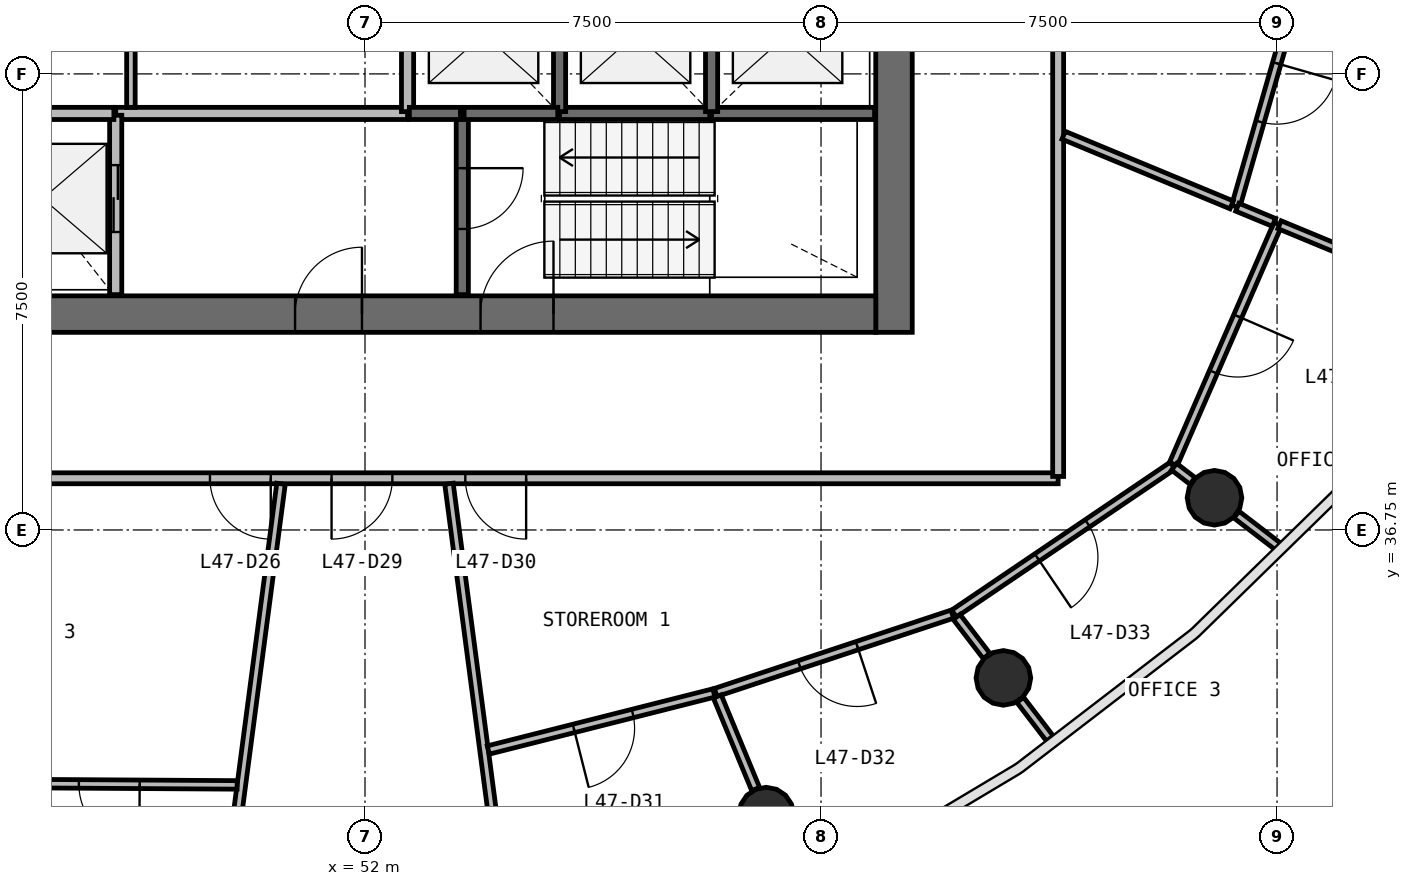
"""IFC4 building model, lengths in metres.
Left out: names, types, materials, properties, quantities, classifications, styles, units other than length and angle.
Written with IfcOpenShell. Run it as: python <this file> out.ifc"""

import sys

from ifc_helpers import new_model, si_unit, direction, frame, frame_2d, origin, origin_2d, place, context, subcontext, project, spatial, rectangle, circle, extrude, source, transform, mapped, element, fill, save


model = new_model("IFC4")
c1 = context("Model", 3, precision=1e-05, world=origin(), true_north=direction((0.0, 1.0)))
c2 = subcontext(c1, "Body", "Model", "MODEL_VIEW")
j1 = project(units=[si_unit("LENGTHUNIT", "METRE"), si_unit("PLANEANGLEUNIT", "RADIAN")], contexts=[c1])
p1 = place(None, origin())
s1 = spatial("IfcSite", under=j1, at=p1, CompositionType="ELEMENT")
p2 = place(p1, origin())
s2 = spatial("IfcBuilding", under=s1, at=p2, CompositionType="ELEMENT")
p3 = place(p2, frame((0.0, 0.0, 195.5)))
s3 = spatial("IfcBuildingStorey", under=s2, at=p3, CompositionType="ELEMENT", Elevation=195.5)
p4 = place(p3, frame((60.7, 40.0, 0.0), z_axis=(0.0, 0.0, 1.0), x_axis=(0.0, 1.0, 0.0)))
e1 = element("IfcWall", 1, at=p4, inside=s3, PredefinedType="SHEAR", context=c2, shape_type="SweptSolid", body=[
    extrude(rectangle(XDim=16.0, YDim=0.6, at=frame_2d((8.0, 0.0))), origin(), (0.0, 0.0, 1.0), 3.9),
])
p5 = place(p4, frame((7.1, 0.0, 0.0)))
e2 = element("IfcOpeningElement", 2, at=p5, cuts=e1, PredefinedType="OPENING", context=c2, shape_type="SweptSolid", body=[
    extrude(rectangle(XDim=1.8, YDim=2.1, at=frame_2d((0.9, 1.05))), frame((0.0, 0.31, 0.0), z_axis=(0.0, -1.0, 0.0), x_axis=(1.0, 0.0, 0.0)), (0.0, 0.0, 1.0), 0.62),
])
p6 = place(p3, frame((43.6, 40.3, 0.0), z_axis=(0.0, 0.0, 1.0), x_axis=(1.0, 0.0, 0.0)))
e3 = element("IfcWall", 3, at=p6, inside=s3, PredefinedType="SHEAR", context=c2, shape_type="SweptSolid", body=[
    extrude(rectangle(XDim=16.8, YDim=0.6, at=frame_2d((8.4, 0.0))), origin(), (0.0, 0.0, 1.0), 3.9),
])
p7 = place(p6, frame((10.3, 0.0, 0.0)))
e4 = element("IfcOpeningElement", 4, at=p7, cuts=e3, PredefinedType="OPENING", context=c2, shape_type="SweptSolid", body=[
    extrude(rectangle(XDim=1.2, YDim=2.1, at=frame_2d((0.6, 1.05))), frame((0.0, 0.31, 0.0), z_axis=(0.0, -1.0, 0.0), x_axis=(1.0, 0.0, 0.0)), (0.0, 0.0, 1.0), 0.62),
])
p8 = place(p6, frame((7.25, 0.0, 0.0)))
e5 = element("IfcOpeningElement", 5, at=p8, cuts=e3, PredefinedType="OPENING", context=c2, shape_type="SweptSolid", body=[
    extrude(rectangle(XDim=1.1, YDim=2.1, at=frame_2d((0.55, 1.05))), frame((0.0, 0.31, 0.0), z_axis=(0.0, -1.0, 0.0), x_axis=(1.0, 0.0, 0.0)), (0.0, 0.0, 1.0), 0.62),
])
p9 = place(p6, frame((0.7, 0.0, 0.0)))
e6 = element("IfcOpeningElement", 6, at=p9, cuts=e3, PredefinedType="OPENING", context=c2, shape_type="SweptSolid", body=[
    extrude(rectangle(XDim=0.8, YDim=2.1, at=frame_2d((0.4, 1.05))), frame((0.0, 0.31, 0.0), z_axis=(0.0, -1.0, 0.0), x_axis=(1.0, 0.0, 0.0)), (0.0, 0.0, 1.0), 0.62),
])
m1 = source(origin(), c2, "Body", "SweptSolid", [
    extrude(circle(Radius=0.45, at=origin_2d()), origin(), (0.0, 0.0, 1.0), 3.9),
])
for number, where, z_axis, x_axis in (
    (7, (58.599, 32.069, 0.0), (0.0, 0.0, 1.0), (1.0, 0.0, 0.0)),
    (8, (62.499, 34.317, 0.0), (0.0, 0.0, 1.0), (1.0, 0.0, 0.0)),
    (9, (65.971, 37.28, 0.0), (0.0, 0.0, 1.0), (1.0, 0.0, 0.0)),
):
    element("IfcColumn", number, at=place(p3, frame(where, z_axis=z_axis, x_axis=x_axis)), inside=s3, PredefinedType="COLUMN", context=c2, shape_type="MappedRepresentation", body=[
        mapped(m1, transform((0.0, 0.0, 0.0), scale=1.0)),
    ])
p10 = place(p3, frame((52.7, 43.6, 0.0), z_axis=(0.0, 0.0, 1.0), x_axis=(-1.0, 0.0, 0.0)))
e10 = element("IfcWall", 10, at=p10, inside=s3, PredefinedType="SOLIDWALL", context=c2, shape_type="SweptSolid", body=[
    extrude(rectangle(XDim=4.8, YDim=0.2, at=frame_2d((2.4, 0.0))), origin(), (0.0, 0.0, 1.0), 3.58),
])
p11 = place(p3, frame((47.9, 40.62, 0.0), z_axis=(0.0, 0.0, 1.0), x_axis=(0.0, 1.0, 0.0)))
e11 = element("IfcWall", 11, at=p11, inside=s3, PredefinedType="SOLIDWALL", context=c2, shape_type="SweptSolid", body=[
    extrude(rectangle(XDim=2.95, YDim=0.2, at=frame_2d((1.475, 0.0))), origin(), (0.0, 0.0, 1.0), 3.58),
])
p12 = place(p11, frame((1.03, 0.0, 0.0)))
e12 = element("IfcOpeningElement", 12, at=p12, cuts=e11, PredefinedType="OPENING", context=c2, shape_type="SweptSolid", body=[
    extrude(rectangle(XDim=1.1, YDim=2.1, at=frame_2d((0.55, 1.05))), frame((0.0, 0.11, 0.0), z_axis=(0.0, -1.0, 0.0), x_axis=(1.0, 0.0, 0.0)), (0.0, 0.0, 1.0), 0.22),
])
p13 = place(p3, frame((53.6, 43.6, 0.0), z_axis=(0.0, 0.0, 1.0), x_axis=(0.0, -1.0, 0.0)))
e13 = element("IfcWall", 13, at=p13, inside=s3, PredefinedType="SOLIDWALL", context=c2, shape_type="SweptSolid", body=[
    extrude(rectangle(XDim=2.98, YDim=0.2, at=frame_2d((1.49, 0.0))), origin(), (0.0, 0.0, 1.0), 3.58),
])
p14 = place(p13, frame((0.9, 0.0, 0.0)))
e14 = element("IfcOpeningElement", 14, at=p14, cuts=e13, PredefinedType="OPENING", context=c2, shape_type="SweptSolid", body=[
    extrude(rectangle(XDim=1.0, YDim=2.1, at=frame_2d((0.5, 1.05))), frame((0.0, 0.11, 0.0), z_axis=(0.0, -1.0, 0.0), x_axis=(1.0, 0.0, 0.0)), (0.0, 0.0, 1.0), 0.22),
])
p15 = place(p3, frame((57.7, 43.6, 0.0), z_axis=(0.0, 0.0, 1.0), x_axis=(1.0, 0.0, 0.0)))
e15 = element("IfcWall", 15, at=p15, inside=s3, PredefinedType="SOLIDWALL", context=c2, shape_type="SweptSolid", body=[
    extrude(rectangle(XDim=2.68, YDim=0.2, at=frame_2d((1.34, 0.0))), origin(), (0.0, 0.0, 1.0), 3.58),
])
p16 = place(p3, frame((55.2, 43.6, 0.0), z_axis=(0.0, 0.0, 1.0), x_axis=(1.0, 0.0, 0.0)))
e16 = element("IfcWall", 16, at=p16, inside=s3, PredefinedType="SOLIDWALL", context=c2, shape_type="SweptSolid", body=[
    extrude(rectangle(XDim=2.47, YDim=0.2, at=frame_2d((1.235, 0.0))), origin(), (0.0, 0.0, 1.0), 3.58),
])
p17 = place(p3, frame((47.87, 43.6, 0.0), z_axis=(0.0, 0.0, 1.0), x_axis=(-1.0, 0.0, 0.0)))
e17 = element("IfcWall", 17, at=p17, inside=s3, PredefinedType="SOLIDWALL", context=c2, shape_type="SweptSolid", body=[
    extrude(rectangle(XDim=2.34, YDim=0.2, at=frame_2d((1.17, 0.0))), origin(), (0.0, 0.0, 1.0), 3.58),
])
for number, where, z_axis, x_axis in (
    (18, (52.7, 45.99, 0.0), (0.0, 0.0, 1.0), (0.0, -1.0, 0.0)),
    (19, (55.2, 43.63, 0.0), (0.0, 0.0, 1.0), (0.0, 1.0, 0.0)),
    (20, (57.7, 43.63, 0.0), (0.0, 0.0, 1.0), (0.0, 1.0, 0.0)),
):
    element("IfcWall", number, at=place(p3, frame(where, z_axis=z_axis, x_axis=x_axis)), inside=s3, PredefinedType="SOLIDWALL", context=c2, shape_type="SweptSolid", body=[
        extrude(rectangle(XDim=2.36, YDim=0.2, at=frame_2d((1.18, 0.0))), origin(), (0.0, 0.0, 1.0), 3.58),
    ])
p18 = place(p3, frame((53.63, 43.6, 0.0), z_axis=(0.0, 0.0, 1.0), x_axis=(1.0, 0.0, 0.0)))
e21 = element("IfcWall", 21, at=p18, inside=s3, PredefinedType="SOLIDWALL", context=c2, shape_type="SweptSolid", body=[
    extrude(rectangle(XDim=1.54, YDim=0.2, at=frame_2d((0.77, 0.0))), origin(), (0.0, 0.0, 1.0), 3.58),
])
p19 = place(p3, frame((52.73, 43.6, 0.0), z_axis=(0.0, 0.0, 1.0), x_axis=(1.0, 0.0, 0.0)))
e22 = element("IfcWall", 22, at=p19, inside=s3, PredefinedType="SOLIDWALL", context=c2, shape_type="SweptSolid", body=[
    extrude(rectangle(XDim=0.84, YDim=0.2, at=frame_2d((0.42, 0.0))), origin(), (0.0, 0.0, 1.0), 3.58),
])
p20 = place(p3, frame((63.4, 37.6, 0.0), z_axis=(0.0, 0.0, 1.0), x_axis=(-1.0, 0.0, 0.0)))
e23 = element("IfcWall", 23, at=p20, inside=s3, PredefinedType="PARTITIONING", context=c2, shape_type="SweptSolid", body=[
    extrude(rectangle(XDim=22.8, YDim=0.18, at=frame_2d((11.4, 0.0))), origin(), (0.0, 0.0, 1.0), 2.88),
])
p21 = place(p20, frame((12.95, 0.0, 0.0)))
e24 = element("IfcOpeningElement", 24, at=p21, cuts=e23, PredefinedType="OPENING", context=c2, shape_type="SweptSolid", body=[
    extrude(rectangle(XDim=1.0, YDim=2.1, at=frame_2d((0.5, 1.05))), frame((0.0, 0.1, 0.0), z_axis=(0.0, -1.0, 0.0), x_axis=(1.0, 0.0, 0.0)), (0.0, 0.0, 1.0), 0.2),
])
p22 = place(p20, frame((10.95, 0.0, 0.0)))
e25 = element("IfcOpeningElement", 25, at=p22, cuts=e23, PredefinedType="OPENING", context=c2, shape_type="SweptSolid", body=[
    extrude(rectangle(XDim=1.0, YDim=2.1, at=frame_2d((0.5, 1.05))), frame((0.0, 0.1, 0.0), z_axis=(0.0, -1.0, 0.0), x_axis=(1.0, 0.0, 0.0)), (0.0, 0.0, 1.0), 0.2),
])
p23 = place(p20, frame((8.75, 0.0, 0.0)))
e26 = element("IfcOpeningElement", 26, at=p23, cuts=e23, PredefinedType="OPENING", context=c2, shape_type="SweptSolid", body=[
    extrude(rectangle(XDim=1.0, YDim=2.1, at=frame_2d((0.5, 1.05))), frame((0.0, 0.1, 0.0), z_axis=(0.0, -1.0, 0.0), x_axis=(1.0, 0.0, 0.0)), (0.0, 0.0, 1.0), 0.2),
])
p24 = place(p3, frame((63.4, 58.37, 0.0), z_axis=(0.0, 0.0, 1.0), x_axis=(0.0, -1.0, 0.0)))
e27 = element("IfcWall", 27, at=p24, inside=s3, PredefinedType="PARTITIONING", context=c2, shape_type="SweptSolid", body=[
    extrude(rectangle(XDim=20.74, YDim=0.18, at=frame_2d((10.37, 0.0))), origin(), (0.0, 0.0, 1.0), 2.88),
])
p25 = place(p24, frame((9.89, 0.0, 0.0)))
e28 = element("IfcOpeningElement", 28, at=p25, cuts=e27, PredefinedType="OPENING", context=c2, shape_type="SweptSolid", body=[
    extrude(rectangle(XDim=1.0, YDim=2.1, at=frame_2d((0.5, 1.05))), frame((0.0, 0.1, 0.0), z_axis=(0.0, -1.0, 0.0), x_axis=(1.0, 0.0, 0.0)), (0.0, 0.0, 1.0), 0.2),
])
p26 = place(p3, frame((49.653, 30.172, 0.0), z_axis=(0.0, 0.0, 1.0), x_axis=(0.130532164535, 0.991444075085, 0.0)))
e29 = element("IfcWall", 29, at=p26, inside=s3, PredefinedType="PARTITIONING", context=c2, shape_type="SweptSolid", body=[
    extrude(rectangle(XDim=7.401, YDim=0.14, at=frame_2d((3.7, 0.0))), origin(), (0.0, 0.0, 1.0), 2.88),
])
p27 = place(p3, frame((53.381, 37.51, 0.0), z_axis=(0.0, 0.0, 1.0), x_axis=(0.130519996386, -0.991445677051, 0.0)))
e30 = element("IfcWall", 30, at=p27, inside=s3, PredefinedType="PARTITIONING", context=c2, shape_type="SweptSolid", body=[
    extrude(rectangle(XDim=6.558, YDim=0.14, at=frame_2d((3.279, 0.0))), origin(), (0.0, 0.0, 1.0), 2.88),
])
p28 = place(p3, frame((49.896, 32.558, 0.0), z_axis=(0.0, 0.0, 1.0), x_axis=(-0.999981480768, 0.006085895215, 0.0)))
e31 = element("IfcWall", 31, at=p28, inside=s3, PredefinedType="PARTITIONING", context=c2, shape_type="SweptSolid", body=[
    extrude(rectangle(XDim=4.252, YDim=0.14, at=frame_2d((2.126, 0.0))), origin(), (0.0, 0.0, 1.0), 2.88),
])
p29 = place(p28, frame((1.602, 0.0, 0.0)))
e32 = element("IfcOpeningElement", 32, at=p29, cuts=e31, PredefinedType="OPENING", context=c2, shape_type="SweptSolid", body=[
    extrude(rectangle(XDim=1.0, YDim=2.1, at=frame_2d((0.5, 1.05))), frame((0.0, 0.08, 0.0), z_axis=(0.0, -1.0, 0.0), x_axis=(1.0, 0.0, 0.0)), (0.0, 0.0, 1.0), 0.16),
])
p30 = place(p3, frame((65.283, 37.808, 0.0), z_axis=(0.0, 0.0, 1.0), x_axis=(-0.828127545773, -0.560539711288, 0.0)))
e33 = element("IfcWall", 33, at=p30, inside=s3, PredefinedType="PARTITIONING", context=c2, shape_type="SweptSolid", body=[
    extrude(rectangle(XDim=4.341, YDim=0.14, at=frame_2d((2.17, 0.0))), origin(), (0.0, 0.0, 1.0), 2.88),
])
p31 = place(p30, frame((1.691, 0.0, 0.0)))
e34 = element("IfcOpeningElement", 34, at=p31, cuts=e33, PredefinedType="OPENING", context=c2, shape_type="SweptSolid", body=[
    extrude(rectangle(XDim=1.0, YDim=2.1, at=frame_2d((0.5, 1.05))), frame((0.0, 0.08, 0.0), z_axis=(0.0, -1.0, 0.0), x_axis=(1.0, 0.0, 0.0)), (0.0, 0.0, 1.0), 0.16),
])
p32 = place(p3, frame((67.013, 41.781, 0.0), z_axis=(0.0, 0.0, 1.0), x_axis=(-0.399327520303, -0.916808339583, 0.0)))
e35 = element("IfcWall", 35, at=p32, inside=s3, PredefinedType="PARTITIONING", context=c2, shape_type="SweptSolid", body=[
    extrude(rectangle(XDim=4.304, YDim=0.14, at=frame_2d((2.152, 0.0))), origin(), (0.0, 0.0, 1.0), 2.88),
])
p33 = place(p32, frame((1.654, 0.0, 0.0)))
e36 = element("IfcOpeningElement", 36, at=p33, cuts=e35, PredefinedType="OPENING", context=c2, shape_type="SweptSolid", body=[
    extrude(rectangle(XDim=1.0, YDim=2.1, at=frame_2d((0.5, 1.05))), frame((0.0, 0.08, 0.0), z_axis=(0.0, -1.0, 0.0), x_axis=(1.0, 0.0, 0.0)), (0.0, 0.0, 1.0), 0.16),
])
p34 = place(p3, frame((61.659, 35.365, 0.0), z_axis=(0.0, 0.0, 1.0), x_axis=(-0.949342227839, -0.314244068267, 0.0)))
e37 = element("IfcWall", 37, at=p34, inside=s3, PredefinedType="PARTITIONING", context=c2, shape_type="SweptSolid", body=[
    extrude(rectangle(XDim=4.1, YDim=0.14, at=frame_2d((2.05, 0.0))), origin(), (0.0, 0.0, 1.0), 2.88),
])
p35 = place(p34, frame((1.65, 0.0, 0.0)))
e38 = element("IfcOpeningElement", 38, at=p35, cuts=e37, PredefinedType="OPENING", context=c2, shape_type="SweptSolid", body=[
    extrude(rectangle(XDim=1.0, YDim=2.1, at=frame_2d((0.5, 1.05))), frame((0.0, 0.08, 0.0), z_axis=(0.0, -1.0, 0.0), x_axis=(1.0, 0.0, 0.0)), (0.0, 0.0, 1.0), 0.16),
])
p36 = place(p3, frame((67.43, 45.939, 0.0), z_axis=(0.0, 0.0, 1.0), x_axis=(-0.276146395888, -0.96111558516, 0.0)))
e39 = element("IfcWall", 39, at=p36, inside=s3, PredefinedType="PARTITIONING", context=c2, shape_type="SweptSolid", body=[
    extrude(rectangle(XDim=4.026, YDim=0.14, at=frame_2d((2.013, 0.0))), origin(), (0.0, 0.0, 1.0), 2.88),
])
p37 = place(p36, frame((1.576, 0.0, 0.0)))
e40 = element("IfcOpeningElement", 40, at=p37, cuts=e39, PredefinedType="OPENING", context=c2, shape_type="SweptSolid", body=[
    extrude(rectangle(XDim=1.0, YDim=2.1, at=frame_2d((0.5, 1.05))), frame((0.0, 0.08, 0.0), z_axis=(0.0, -1.0, 0.0), x_axis=(1.0, 0.0, 0.0)), (0.0, 0.0, 1.0), 0.16),
])
p38 = place(p3, frame((57.738, 34.07, 0.0), z_axis=(0.0, 0.0, 1.0), x_axis=(-0.969463236933, -0.245236686152, 0.0)))
e41 = element("IfcWall", 41, at=p38, inside=s3, PredefinedType="PARTITIONING", context=c2, shape_type="SweptSolid", body=[
    extrude(rectangle(XDim=3.827, YDim=0.14, at=frame_2d((1.914, 0.0))), origin(), (0.0, 0.0, 1.0), 2.88),
])
p39 = place(p38, frame((1.377, 0.0, 0.0)))
e42 = element("IfcOpeningElement", 42, at=p39, cuts=e41, PredefinedType="OPENING", context=c2, shape_type="SweptSolid", body=[
    extrude(rectangle(XDim=1.0, YDim=2.1, at=frame_2d((0.5, 1.05))), frame((0.0, 0.08, 0.0), z_axis=(0.0, -1.0, 0.0), x_axis=(1.0, 0.0, 0.0)), (0.0, 0.0, 1.0), 0.16),
])
p40 = place(p3, frame((66.346, 42.058, 0.0), z_axis=(0.0, 0.0, 1.0), x_axis=(0.923916464962, -0.382594257371, 0.0)))
e43 = element("IfcWall", 43, at=p40, inside=s3, PredefinedType="PARTITIONING", context=c2, shape_type="SweptSolid", body=[
    extrude(rectangle(XDim=0.652, YDim=0.14, at=frame_2d((0.326, 0.0))), origin(), (0.0, 0.0, 1.0), 2.88),
])
p41 = place(p3, frame((63.49, 43.241, 0.0), z_axis=(0.0, 0.0, 1.0), x_axis=(0.923864621618, -0.382719428462, 0.0)))
e44 = element("IfcWall", 44, at=p41, inside=s3, PredefinedType="PARTITIONING", context=c2, shape_type="SweptSolid", body=[
    extrude(rectangle(XDim=2.991, YDim=0.14, at=frame_2d((1.496, 0.0))), origin(), (0.0, 0.0, 1.0), 2.88),
])
p42 = place(p3, frame((67.041, 41.77, 0.0), z_axis=(0.0, 0.0, 1.0), x_axis=(0.923880918209, -0.382680086977, 0.0)))
e45 = element("IfcWall", 45, at=p42, inside=s3, PredefinedType="PARTITIONING", context=c2, shape_type="SweptSolid", body=[
    extrude(rectangle(XDim=1.729, YDim=0.14, at=frame_2d((0.865, 0.0))), origin(), (0.0, 0.0, 1.0), 2.88),
])
p43 = place(p3, frame((48.15, 43.7, 0.0), z_axis=(0.0, 0.0, 1.0), x_axis=(0.0, 1.0, 0.0)))
e46 = element("IfcWall", 46, at=p43, inside=s3, PredefinedType="PARTITIONING", context=c2, shape_type="SweptSolid", body=[
    extrude(rectangle(XDim=2.29, YDim=0.14, at=frame_2d((1.145, 0.0))), origin(), (0.0, 0.0, 1.0), 2.88),
])
p44 = place(p3, frame((57.794, 34.012, 0.0), z_axis=(0.0, 0.0, 1.0), x_axis=(0.382648241093, -0.923894108428, 0.0)))
e47 = element("IfcWall", 47, at=p44, inside=s3, PredefinedType="PARTITIONING", context=c2, shape_type="SweptSolid", body=[
    extrude(rectangle(XDim=1.649, YDim=0.14, at=frame_2d((0.824, 0.0))), origin(), (0.0, 0.0, 1.0), 2.88),
])
p45 = place(p3, frame((61.73, 35.319, 0.0), z_axis=(0.0, 0.0, 1.0), x_axis=(0.608659697441, -0.793431391307, 0.0)))
e48 = element("IfcWall", 48, at=p45, inside=s3, PredefinedType="PARTITIONING", context=c2, shape_type="SweptSolid", body=[
    extrude(rectangle(XDim=0.809, YDim=0.14, at=frame_2d((0.404, 0.0))), origin(), (0.0, 0.0, 1.0), 2.88),
])
p46 = place(p3, frame((66.332, 37.003, 0.0), z_axis=(0.0, 0.0, 1.0), x_axis=(0.7933756116, -0.608732403374, 0.0)))
e49 = element("IfcWall", 49, at=p46, inside=s3, PredefinedType="PARTITIONING", context=c2, shape_type="SweptSolid", body=[
    extrude(rectangle(XDim=0.869, YDim=0.14, at=frame_2d((0.434, 0.0))), origin(), (0.0, 0.0, 1.0), 2.88),
])
p47 = place(p3, frame((62.776, 33.956, 0.0), z_axis=(0.0, 0.0, 1.0), x_axis=(0.608783126566, -0.793336690698, 0.0)))
e50 = element("IfcWall", 50, at=p47, inside=s3, PredefinedType="PARTITIONING", context=c2, shape_type="SweptSolid", body=[
    extrude(rectangle(XDim=0.802, YDim=0.14, at=frame_2d((0.401, 0.0))), origin(), (0.0, 0.0, 1.0), 2.88),
])
p48 = place(p3, frame((65.306, 37.79, 0.0), z_axis=(0.0, 0.0, 1.0), x_axis=(0.793452471415, -0.608632217029, 0.0)))
e51 = element("IfcWall", 51, at=p48, inside=s3, PredefinedType="PARTITIONING", context=c2, shape_type="SweptSolid", body=[
    extrude(rectangle(XDim=0.383, YDim=0.14, at=frame_2d((0.191, 0.0))), origin(), (0.0, 0.0, 1.0), 2.88),
])
m2 = source(origin(), c2, "Body", "SweptSolid", [
    extrude(rectangle(XDim=1.1, YDim=2.1, at=frame_2d((0.55, 1.05))), frame((0.0, 0.025, 0.0), z_axis=(0.0, -1.0, 0.0), x_axis=(1.0, 0.0, 0.0)), (0.0, 0.0, 1.0), 0.05),
])
p49 = place(p12, origin())
e52 = element("IfcDoor", 52, at=p49, inside=s3, OperationType="DOUBLE_DOOR_SLIDING", PredefinedType="USERDEFINED", context=c2, shape_type="MappedRepresentation", body=[
    mapped(m2, transform((0.0, 0.0, 0.0), scale=1.0)),
])
fill(e12, e52)
m3 = source(origin(), c2, "Body", "SweptSolid", [
    extrude(rectangle(XDim=1.2, YDim=2.1, at=frame_2d((0.6, 1.05))), frame((0.0, 0.025, 0.0), z_axis=(0.0, -1.0, 0.0), x_axis=(1.0, 0.0, 0.0)), (0.0, 0.0, 1.0), 0.05),
])
p50 = place(p7, origin())
e53 = element("IfcDoor", 53, at=p50, inside=s3, OperationType="SINGLE_SWING_RIGHT", PredefinedType="DOOR", context=c2, shape_type="MappedRepresentation", body=[
    mapped(m3, transform((0.0, 0.0, 0.0), scale=1.0)),
])
fill(e4, e53)
m4 = source(origin(), c2, "Body", "SweptSolid", [
    extrude(rectangle(XDim=1.0, YDim=2.1, at=frame_2d((0.5, 1.05))), frame((0.0, 0.025, 0.0), z_axis=(0.0, -1.0, 0.0), x_axis=(1.0, 0.0, 0.0)), (0.0, 0.0, 1.0), 0.05),
])
p51 = place(p14, origin())
e54 = element("IfcDoor", 54, at=p51, inside=s3, OperationType="SINGLE_SWING_LEFT", PredefinedType="DOOR", context=c2, shape_type="MappedRepresentation", body=[
    mapped(m4, transform((0.0, 0.0, 0.0), scale=1.0)),
])
fill(e14, e54)
m5 = source(origin(), c2, "Body", "SweptSolid", [
    extrude(rectangle(XDim=1.1, YDim=2.1, at=frame_2d((0.55, 1.05))), frame((0.0, 0.025, 0.0), z_axis=(0.0, -1.0, 0.0), x_axis=(1.0, 0.0, 0.0)), (0.0, 0.0, 1.0), 0.05),
])
p52 = place(p8, origin())
e55 = element("IfcDoor", 55, at=p52, inside=s3, OperationType="SINGLE_SWING_RIGHT", PredefinedType="DOOR", context=c2, shape_type="MappedRepresentation", body=[
    mapped(m5, transform((0.0, 0.0, 0.0), scale=1.0)),
])
fill(e5, e55)
m6 = source(origin(), c2, "Body", "SweptSolid", [
    extrude(rectangle(XDim=1.0, YDim=2.1, at=frame_2d((0.5, 1.05))), frame((0.0, 0.025, 0.0), z_axis=(0.0, -1.0, 0.0), x_axis=(1.0, 0.0, 0.0)), (0.0, 0.0, 1.0), 0.05),
])
p53 = place(p21, origin())
e56 = element("IfcDoor", 56, at=p53, inside=s3, OperationType="SINGLE_SWING_LEFT", PredefinedType="DOOR", context=c2, shape_type="MappedRepresentation", body=[
    mapped(m6, transform((0.0, 0.0, 0.0), scale=1.0)),
])
fill(e24, e56)
p54 = place(p29, origin())
e57 = element("IfcDoor", 57, at=p54, inside=s3, OperationType="SINGLE_SWING_LEFT", PredefinedType="DOOR", context=c2, shape_type="MappedRepresentation", body=[
    mapped(m6, transform((0.0, 0.0, 0.0), scale=1.0)),
])
fill(e32, e57)
p55 = place(p22, origin())
e58 = element("IfcDoor", 58, at=p55, inside=s3, OperationType="SINGLE_SWING_RIGHT", PredefinedType="DOOR", context=c2, shape_type="MappedRepresentation", body=[
    mapped(m6, transform((0.0, 0.0, 0.0), scale=1.0)),
])
fill(e25, e58)
p56 = place(p23, origin())
e59 = element("IfcDoor", 59, at=p56, inside=s3, OperationType="SINGLE_SWING_LEFT", PredefinedType="DOOR", context=c2, shape_type="MappedRepresentation", body=[
    mapped(m6, transform((0.0, 0.0, 0.0), scale=1.0)),
])
fill(e26, e59)
p57 = place(p39, origin())
e60 = element("IfcDoor", 60, at=p57, inside=s3, OperationType="SINGLE_SWING_RIGHT", PredefinedType="DOOR", context=c2, shape_type="MappedRepresentation", body=[
    mapped(m6, transform((0.0, 0.0, 0.0), scale=1.0)),
])
fill(e42, e60)
p58 = place(p35, origin())
e61 = element("IfcDoor", 61, at=p58, inside=s3, OperationType="SINGLE_SWING_LEFT", PredefinedType="DOOR", context=c2, shape_type="MappedRepresentation", body=[
    mapped(m6, transform((0.0, 0.0, 0.0), scale=1.0)),
])
fill(e38, e61)
p59 = place(p31, origin())
e62 = element("IfcDoor", 62, at=p59, inside=s3, OperationType="SINGLE_SWING_RIGHT", PredefinedType="DOOR", context=c2, shape_type="MappedRepresentation", body=[
    mapped(m6, transform((0.0, 0.0, 0.0), scale=1.0)),
])
fill(e34, e62)
p60 = place(p33, origin())
e63 = element("IfcDoor", 63, at=p60, inside=s3, OperationType="SINGLE_SWING_LEFT", PredefinedType="DOOR", context=c2, shape_type="MappedRepresentation", body=[
    mapped(m6, transform((0.0, 0.0, 0.0), scale=1.0)),
])
fill(e36, e63)
p61 = place(p37, origin())
e64 = element("IfcDoor", 64, at=p61, inside=s3, OperationType="SINGLE_SWING_LEFT", PredefinedType="DOOR", context=c2, shape_type="MappedRepresentation", body=[
    mapped(m6, transform((0.0, 0.0, 0.0), scale=1.0)),
])
fill(e40, e64)
save(model, sys.argv[1])
